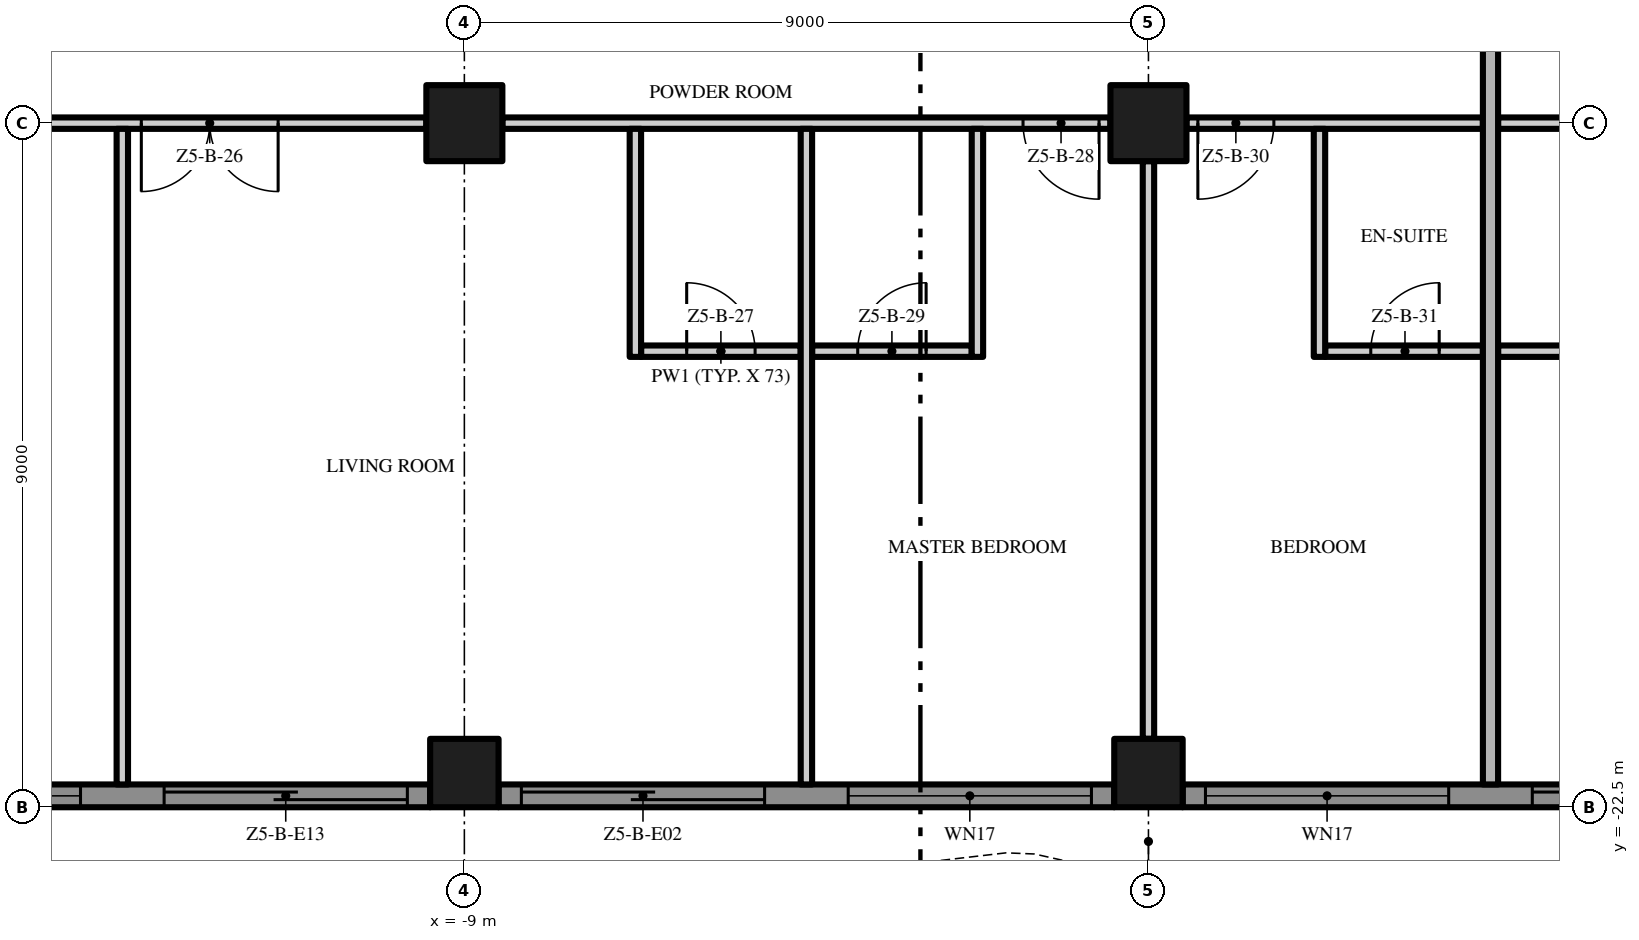
"""IFC4 building model, lengths in metres.
Left out: names, types, materials, properties, quantities, classifications, styles, units other than length and angle.
Written with IfcOpenShell. Run it as: python <this file> out.ifc"""

import sys

from ifc_helpers import new_model, si_unit, direction, frame, frame_2d, origin, origin_2d, place, context, subcontext, project, spatial, polyline, rectangle, outline, extrude, element, fill, save


model = new_model("IFC4")
c1 = context("Model", 3, precision=1e-05, world=origin(), true_north=direction((0.0, 1.0)))
c2 = subcontext(c1, "Body", "Model", "MODEL_VIEW")
j1 = project(units=[si_unit("LENGTHUNIT", "METRE"), si_unit("PLANEANGLEUNIT", "RADIAN")], contexts=[c1])
p1 = place(None, origin())
s1 = spatial("IfcSite", under=j1, at=p1, CompositionType="ELEMENT")
p2 = place(p1, origin())
s2 = spatial("IfcBuilding", under=s1, at=p2, CompositionType="ELEMENT")
p3 = place(p2, frame((0.0, 0.0, 254.0)))
s3 = spatial("IfcBuildingStorey", under=s2, at=p3, CompositionType="ELEMENT", Elevation=254.0)
p4 = place(p3, frame((-9.0, -13.5, 0.0), z_axis=(0.0, 0.0, 1.0), x_axis=(1.0, 0.0, 0.0)))
e1 = element("IfcColumn", 1, at=p4, inside=s3, PredefinedType="COLUMN", context=c2, shape_type="SweptSolid", body=[
    extrude(rectangle(XDim=1.0, YDim=1.0, at=origin_2d()), origin(), (0.0, 0.0, 1.0), 3.5),
])
p5 = place(p3, frame((-9.0, -22.05, 0.0), z_axis=(0.0, 0.0, 1.0), x_axis=(1.0, 0.0, 0.0)))
e2 = element("IfcColumn", 2, at=p5, inside=s3, PredefinedType="COLUMN", context=c2, shape_type="SweptSolid", body=[
    extrude(rectangle(XDim=0.9, YDim=0.9, at=origin_2d()), origin(), (0.0, 0.0, 1.0), 3.5),
])
p6 = place(p3, frame((0.0, -13.5, 0.0), z_axis=(0.0, 0.0, 1.0), x_axis=(1.0, 0.0, 0.0)))
e3 = element("IfcColumn", 3, at=p6, inside=s3, PredefinedType="COLUMN", context=c2, shape_type="SweptSolid", body=[
    extrude(rectangle(XDim=1.0, YDim=1.0, at=origin_2d()), origin(), (0.0, 0.0, 1.0), 3.5),
])
p7 = place(p3, frame((0.0, -22.05, 0.0), z_axis=(0.0, 0.0, 1.0), x_axis=(1.0, 0.0, 0.0)))
e4 = element("IfcColumn", 4, at=p7, inside=s3, PredefinedType="COLUMN", context=c2, shape_type="SweptSolid", body=[
    extrude(rectangle(XDim=0.9, YDim=0.9, at=origin_2d()), origin(), (0.0, 0.0, 1.0), 3.5),
])
p8 = place(p3, frame((-9.45, -22.35, 0.0), z_axis=(0.0, 0.0, 1.0), x_axis=(-1.0, 0.0, 0.0)))
e5 = element("IfcWall", 5, at=p8, inside=s3, PredefinedType="SOLIDWALL", context=c2, shape_type="SweptSolid", body=[
    extrude(rectangle(XDim=8.1, YDim=0.3, at=frame_2d((4.05, 0.0))), origin(), (0.0, 0.0, 1.0), 3.5),
])
p9 = place(p8, frame((4.6, 0.0, 0.45)))
e6 = element("IfcOpeningElement", 6, at=p9, cuts=e5, PredefinedType="OPENING", context=c2, shape_type="SweptSolid", body=[
    extrude(rectangle(XDim=3.2, YDim=2.65, at=frame_2d((1.6, 1.325))), frame((0.0, 0.16, 0.0), z_axis=(0.0, -1.0, 0.0), x_axis=(1.0, 0.0, 0.0)), (0.0, 0.0, 1.0), 0.32),
])
p10 = place(p8, frame((0.3, 0.0, 0.0)))
e7 = element("IfcOpeningElement", 7, at=p10, cuts=e5, PredefinedType="OPENING", context=c2, shape_type="SweptSolid", body=[
    extrude(rectangle(XDim=3.2, YDim=2.4, at=frame_2d((1.6, 1.2))), frame((0.0, 0.16, 0.0), z_axis=(0.0, -1.0, 0.0), x_axis=(1.0, 0.0, 0.0)), (0.0, 0.0, 1.0), 0.32),
])
p11 = place(p3, frame((-0.45, -22.35, 0.0), z_axis=(0.0, 0.0, 1.0), x_axis=(-1.0, 0.0, 0.0)))
e8 = element("IfcWall", 8, at=p11, inside=s3, PredefinedType="SOLIDWALL", context=c2, shape_type="SweptSolid", body=[
    extrude(rectangle(XDim=8.1, YDim=0.3, at=frame_2d((4.05, 0.0))), origin(), (0.0, 0.0, 1.0), 3.5),
])
p12 = place(p11, frame((4.6, 0.0, 0.0)))
e9 = element("IfcOpeningElement", 9, at=p12, cuts=e8, PredefinedType="OPENING", context=c2, shape_type="SweptSolid", body=[
    extrude(rectangle(XDim=3.2, YDim=2.4, at=frame_2d((1.6, 1.2))), frame((0.0, 0.16, 0.0), z_axis=(0.0, -1.0, 0.0), x_axis=(1.0, 0.0, 0.0)), (0.0, 0.0, 1.0), 0.32),
])
p13 = place(p11, frame((0.3, 0.0, 0.45)))
e10 = element("IfcOpeningElement", 10, at=p13, cuts=e8, PredefinedType="OPENING", context=c2, shape_type="SweptSolid", body=[
    extrude(rectangle(XDim=3.2, YDim=2.65, at=frame_2d((1.6, 1.325))), frame((0.0, 0.16, 0.0), z_axis=(0.0, -1.0, 0.0), x_axis=(1.0, 0.0, 0.0)), (0.0, 0.0, 1.0), 0.32),
])
p14 = place(p3, frame((8.55, -22.35, 0.0), z_axis=(0.0, 0.0, 1.0), x_axis=(-1.0, 0.0, 0.0)))
e11 = element("IfcWall", 11, at=p14, inside=s3, PredefinedType="SOLIDWALL", context=c2, shape_type="SweptSolid", body=[
    extrude(rectangle(XDim=8.1, YDim=0.3, at=frame_2d((4.05, 0.0))), origin(), (0.0, 0.0, 1.0), 3.5),
])
p15 = place(p14, frame((4.6, 0.0, 0.45)))
e12 = element("IfcOpeningElement", 12, at=p15, cuts=e11, PredefinedType="OPENING", context=c2, shape_type="SweptSolid", body=[
    extrude(rectangle(XDim=3.2, YDim=2.65, at=frame_2d((1.6, 1.325))), frame((0.0, 0.16, 0.0), z_axis=(0.0, -1.0, 0.0), x_axis=(1.0, 0.0, 0.0)), (0.0, 0.0, 1.0), 0.32),
])
p16 = place(p14, frame((0.3, 0.0, 0.0)))
e13 = element("IfcOpeningElement", 13, at=p16, cuts=e11, PredefinedType="OPENING", context=c2, shape_type="SweptSolid", body=[
    extrude(rectangle(XDim=3.2, YDim=2.4, at=frame_2d((1.6, 1.2))), frame((0.0, 0.16, 0.0), z_axis=(0.0, -1.0, 0.0), x_axis=(1.0, 0.0, 0.0)), (0.0, 0.0, 1.0), 0.32),
])
p17 = place(p3, origin())
e14 = element("IfcWall", 14, at=p17, inside=s3, PredefinedType="USERDEFINED", context=c2, shape_type="SweptSolid", body=[
    extrude(outline(polyline([(-22.5, -25.149), (-21.0, -24.488), (-19.5, -23.755), (-18.0, -23.231), (-16.875, -23.1), (-16.5, -23.115), (-15.0, -23.451), (-13.5, -24.112), (-12.0, -24.845), (-10.5, -25.369), (-9.375, -25.5), (-9.0, -25.485), (-7.5, -25.149), (-6.0, -24.488), (-4.5, -23.755), (-3.0, -23.231), (-1.875, -23.1), (-1.5, -23.115), (0.0, -23.451), (1.5, -24.112), (3.0, -24.845), (4.5, -25.369), (5.625, -25.5), (6.0, -25.485), (7.5, -25.149), (9.0, -24.488), (10.5, -23.755), (12.0, -23.231), (13.125, -23.1), (13.5, -23.115), (15.0, -23.451), (16.5, -24.112), (18.0, -24.845), (19.5, -25.369), (20.625, -25.5), (21.0, -25.485), (22.5, -25.149), (22.445, -24.905), (20.967, -25.236), (20.635, -25.249), (19.556, -25.124), (18.096, -24.614), (16.605, -23.885), (15.079, -23.213), (13.533, -22.866), (13.115, -22.849), (11.944, -22.986), (10.404, -23.524), (8.895, -24.261), (7.421, -24.91), (5.967, -25.236), (5.635, -25.249), (4.556, -25.124), (3.096, -24.614), (1.605, -23.885), (0.079, -23.213), (-1.467, -22.866), (-1.885, -22.849), (-3.056, -22.986), (-4.596, -23.524), (-6.105, -24.261), (-7.579, -24.91), (-9.033, -25.236), (-9.365, -25.249), (-10.444, -25.124), (-11.904, -24.614), (-13.395, -23.885), (-14.921, -23.213), (-16.467, -22.866), (-16.885, -22.849), (-18.056, -22.986), (-19.596, -23.524), (-21.105, -24.261), (-22.601, -24.92), (-22.5, -25.149)])), origin(), (0.0, 0.0, 1.0), 0.9),
])
p18 = place(p3, frame((-6.675, -16.5, 0.0), z_axis=(0.0, 0.0, 1.0), x_axis=(1.0, 0.0, 0.0)))
e15 = element("IfcWall", 15, at=p18, inside=s3, PredefinedType="PARTITIONING", context=c2, shape_type="SweptSolid", body=[
    extrude(rectangle(XDim=2.1, YDim=0.15, at=frame_2d((1.05, 0.0))), origin(), (0.0, 0.0, 1.0), 3.5),
])
p19 = place(p18, frame((0.6, 0.0, 0.0)))
e16 = element("IfcOpeningElement", 16, at=p19, cuts=e15, PredefinedType="OPENING", context=c2, shape_type="SweptSolid", body=[
    extrude(rectangle(XDim=0.9, YDim=2.1, at=frame_2d((0.45, 1.05))), frame((0.0, 0.085, 0.0), z_axis=(0.0, -1.0, 0.0), x_axis=(1.0, 0.0, 0.0)), (0.0, 0.0, 1.0), 0.17),
])
p20 = place(p3, frame((-4.425, -16.5, 0.0), z_axis=(0.0, 0.0, 1.0), x_axis=(1.0, 0.0, 0.0)))
e17 = element("IfcWall", 17, at=p20, inside=s3, PredefinedType="PARTITIONING", context=c2, shape_type="SweptSolid", body=[
    extrude(rectangle(XDim=2.1, YDim=0.15, at=frame_2d((1.05, 0.0))), origin(), (0.0, 0.0, 1.0), 3.5),
])
p21 = place(p20, frame((0.6, 0.0, 0.0)))
e18 = element("IfcOpeningElement", 18, at=p21, cuts=e17, PredefinedType="OPENING", context=c2, shape_type="SweptSolid", body=[
    extrude(rectangle(XDim=0.9, YDim=2.1, at=frame_2d((0.45, 1.05))), frame((0.0, 0.085, 0.0), z_axis=(0.0, -1.0, 0.0), x_axis=(1.0, 0.0, 0.0)), (0.0, 0.0, 1.0), 0.17),
])
p22 = place(p3, frame((2.325, -16.5, 0.0), z_axis=(0.0, 0.0, 1.0), x_axis=(1.0, 0.0, 0.0)))
e19 = element("IfcWall", 19, at=p22, inside=s3, PredefinedType="PARTITIONING", context=c2, shape_type="SweptSolid", body=[
    extrude(rectangle(XDim=2.075, YDim=0.15, at=frame_2d((1.038, 0.0))), origin(), (0.0, 0.0, 1.0), 3.5),
])
p23 = place(p22, frame((0.6, 0.0, 0.0)))
e20 = element("IfcOpeningElement", 20, at=p23, cuts=e19, PredefinedType="OPENING", context=c2, shape_type="SweptSolid", body=[
    extrude(rectangle(XDim=0.9, YDim=2.1, at=frame_2d((0.45, 1.05))), frame((0.0, 0.085, 0.0), z_axis=(0.0, -1.0, 0.0), x_axis=(1.0, 0.0, 0.0)), (0.0, 0.0, 1.0), 0.17),
])
p24 = place(p3, frame((4.6, -16.5, 0.0), z_axis=(0.0, 0.0, 1.0), x_axis=(1.0, 0.0, 0.0)))
e21 = element("IfcWall", 21, at=p24, inside=s3, PredefinedType="PARTITIONING", context=c2, shape_type="SweptSolid", body=[
    extrude(rectangle(XDim=2.075, YDim=0.15, at=frame_2d((1.038, 0.0))), origin(), (0.0, 0.0, 1.0), 3.5),
])
p25 = place(p3, frame((-9.5, -13.5, 0.0), z_axis=(0.0, 0.0, 1.0), x_axis=(-1.0, 0.0, 0.0)))
e22 = element("IfcWall", 22, at=p25, inside=s3, PredefinedType="PARTITIONING", context=c2, shape_type="SweptSolid", body=[
    extrude(rectangle(XDim=8.0, YDim=0.15, at=frame_2d((4.0, 0.0))), origin(), (0.0, 0.0, 1.0), 3.5),
])
p26 = place(p25, frame((1.95, 0.0, 0.0)))
e23 = element("IfcOpeningElement", 23, at=p26, cuts=e22, PredefinedType="OPENING", context=c2, shape_type="SweptSolid", body=[
    extrude(rectangle(XDim=1.8, YDim=2.4, at=frame_2d((0.9, 1.2))), frame((0.0, 0.085, 0.0), z_axis=(0.0, -1.0, 0.0), x_axis=(1.0, 0.0, 0.0)), (0.0, 0.0, 1.0), 0.17),
])
p27 = place(p3, frame((-0.5, -13.5, 0.0), z_axis=(0.0, 0.0, 1.0), x_axis=(-1.0, 0.0, 0.0)))
e24 = element("IfcWall", 24, at=p27, inside=s3, PredefinedType="PARTITIONING", context=c2, shape_type="SweptSolid", body=[
    extrude(rectangle(XDim=8.0, YDim=0.15, at=frame_2d((4.0, 0.0))), origin(), (0.0, 0.0, 1.0), 3.5),
])
p28 = place(p27, frame((0.15, 0.0, 0.0)))
e25 = element("IfcOpeningElement", 25, at=p28, cuts=e24, PredefinedType="OPENING", context=c2, shape_type="SweptSolid", body=[
    extrude(rectangle(XDim=1.0, YDim=2.4, at=frame_2d((0.5, 1.2))), frame((0.0, 0.085, 0.0), z_axis=(0.0, -1.0, 0.0), x_axis=(1.0, 0.0, 0.0)), (0.0, 0.0, 1.0), 0.17),
])
p29 = place(p3, frame((4.4, -13.5, 0.0), z_axis=(0.0, 0.0, 1.0), x_axis=(-1.0, 0.0, 0.0)))
e26 = element("IfcWall", 26, at=p29, inside=s3, PredefinedType="PARTITIONING", context=c2, shape_type="SweptSolid", body=[
    extrude(rectangle(XDim=3.9, YDim=0.15, at=frame_2d((1.95, 0.0))), origin(), (0.0, 0.0, 1.0), 3.5),
])
p30 = place(p29, frame((2.75, 0.0, 0.0)))
e27 = element("IfcOpeningElement", 27, at=p30, cuts=e26, PredefinedType="OPENING", context=c2, shape_type="SweptSolid", body=[
    extrude(rectangle(XDim=1.0, YDim=2.4, at=frame_2d((0.5, 1.2))), frame((0.0, 0.085, 0.0), z_axis=(0.0, -1.0, 0.0), x_axis=(1.0, 0.0, 0.0)), (0.0, 0.0, 1.0), 0.17),
])
p31 = place(p3, frame((4.6, -13.5, 0.0), z_axis=(0.0, 0.0, 1.0), x_axis=(1.0, 0.0, 0.0)))
e28 = element("IfcWall", 28, at=p31, inside=s3, PredefinedType="PARTITIONING", context=c2, shape_type="SweptSolid", body=[
    extrude(rectangle(XDim=3.9, YDim=0.15, at=frame_2d((1.95, 0.0))), origin(), (0.0, 0.0, 1.0), 3.5),
])
p32 = place(p3, frame((-13.5, -22.2, 0.0), z_axis=(0.0, 0.0, 1.0), x_axis=(0.0, 1.0, 0.0)))
e29 = element("IfcWall", 29, at=p32, inside=s3, PredefinedType="PARTITIONING", context=c2, shape_type="SweptSolid", body=[
    extrude(rectangle(XDim=8.625, YDim=0.15, at=frame_2d((4.312, 0.0))), origin(), (0.0, 0.0, 1.0), 3.5),
])
p33 = place(p3, frame((-6.75, -16.575, 0.0), z_axis=(0.0, 0.0, 1.0), x_axis=(0.0, 1.0, 0.0)))
e30 = element("IfcWall", 30, at=p33, inside=s3, PredefinedType="PARTITIONING", context=c2, shape_type="SweptSolid", body=[
    extrude(rectangle(XDim=3.0, YDim=0.15, at=frame_2d((1.5, 0.0))), origin(), (0.0, 0.0, 1.0), 3.5),
])
p34 = place(p3, frame((-4.5, -22.2, 0.0), z_axis=(0.0, 0.0, 1.0), x_axis=(0.0, 1.0, 0.0)))
e31 = element("IfcWall", 31, at=p34, inside=s3, PredefinedType="PARTITIONING", context=c2, shape_type="SweptSolid", body=[
    extrude(rectangle(XDim=8.625, YDim=0.15, at=frame_2d((4.312, 0.0))), origin(), (0.0, 0.0, 1.0), 3.5),
])
p35 = place(p3, frame((-2.25, -16.575, 0.0), z_axis=(0.0, 0.0, 1.0), x_axis=(0.0, 1.0, 0.0)))
e32 = element("IfcWall", 32, at=p35, inside=s3, PredefinedType="PARTITIONING", context=c2, shape_type="SweptSolid", body=[
    extrude(rectangle(XDim=3.0, YDim=0.15, at=frame_2d((1.5, 0.0))), origin(), (0.0, 0.0, 1.0), 3.5),
])
p36 = place(p3, frame((0.0, -21.6, 0.0), z_axis=(0.0, 0.0, 1.0), x_axis=(0.0, 1.0, 0.0)))
e33 = element("IfcWall", 33, at=p36, inside=s3, PredefinedType="PARTITIONING", context=c2, shape_type="SweptSolid", body=[
    extrude(rectangle(XDim=7.6, YDim=0.15, at=frame_2d((3.8, 0.0))), origin(), (0.0, 0.0, 1.0), 3.5),
])
p37 = place(p3, frame((2.25, -16.575, 0.0), z_axis=(0.0, 0.0, 1.0), x_axis=(0.0, 1.0, 0.0)))
e34 = element("IfcWall", 34, at=p37, inside=s3, PredefinedType="PARTITIONING", context=c2, shape_type="SweptSolid", body=[
    extrude(rectangle(XDim=3.0, YDim=0.15, at=frame_2d((1.5, 0.0))), origin(), (0.0, 0.0, 1.0), 3.5),
])
p38 = place(p3, frame((4.5, -22.2, 0.0), z_axis=(0.0, 0.0, 1.0), x_axis=(0.0, 1.0, 0.0)))
e35 = element("IfcWall", 35, at=p38, inside=s3, PredefinedType="PARTITIONING", context=c2, shape_type="SweptSolid", body=[
    extrude(rectangle(XDim=22.1, YDim=0.2, at=frame_2d((11.05, 0.0))), origin(), (0.0, 0.0, 1.0), 3.5),
])
p39 = place(p9, origin())
e36 = element("IfcWindow", 36, at=p39, inside=s3, PartitioningType="SINGLE_PANEL", PredefinedType="WINDOW", context=c2, shape_type="SweptSolid", body=[
    extrude(rectangle(XDim=3.2, YDim=2.65, at=frame_2d((1.6, 1.325))), frame((0.0, 0.03, 0.0), z_axis=(0.0, -1.0, 0.0), x_axis=(1.0, 0.0, 0.0)), (0.0, 0.0, 1.0), 0.06),
])
fill(e6, e36)
p40 = place(p10, origin())
e37 = element("IfcDoor", 37, at=p40, inside=s3, OperationType="SINGLE_SWING_LEFT", PredefinedType="DOOR", context=c2, shape_type="SweptSolid", body=[
    extrude(rectangle(XDim=3.2, YDim=2.4, at=frame_2d((1.6, 1.2))), frame((0.0, 0.025, 0.0), z_axis=(0.0, -1.0, 0.0), x_axis=(1.0, 0.0, 0.0)), (0.0, 0.0, 1.0), 0.05),
])
fill(e7, e37)
p41 = place(p12, origin())
e38 = element("IfcDoor", 38, at=p41, inside=s3, OperationType="SINGLE_SWING_LEFT", PredefinedType="DOOR", context=c2, shape_type="SweptSolid", body=[
    extrude(rectangle(XDim=3.2, YDim=2.4, at=frame_2d((1.6, 1.2))), frame((0.0, 0.025, 0.0), z_axis=(0.0, -1.0, 0.0), x_axis=(1.0, 0.0, 0.0)), (0.0, 0.0, 1.0), 0.05),
])
fill(e9, e38)
p42 = place(p13, origin())
e39 = element("IfcWindow", 39, at=p42, inside=s3, PartitioningType="SINGLE_PANEL", PredefinedType="WINDOW", context=c2, shape_type="SweptSolid", body=[
    extrude(rectangle(XDim=3.2, YDim=2.65, at=frame_2d((1.6, 1.325))), frame((0.0, 0.03, 0.0), z_axis=(0.0, -1.0, 0.0), x_axis=(1.0, 0.0, 0.0)), (0.0, 0.0, 1.0), 0.06),
])
fill(e10, e39)
p43 = place(p15, origin())
e40 = element("IfcWindow", 40, at=p43, inside=s3, PartitioningType="SINGLE_PANEL", PredefinedType="WINDOW", context=c2, shape_type="SweptSolid", body=[
    extrude(rectangle(XDim=3.2, YDim=2.65, at=frame_2d((1.6, 1.325))), frame((0.0, 0.03, 0.0), z_axis=(0.0, -1.0, 0.0), x_axis=(1.0, 0.0, 0.0)), (0.0, 0.0, 1.0), 0.06),
])
fill(e12, e40)
p44 = place(p16, origin())
e41 = element("IfcDoor", 41, at=p44, inside=s3, OperationType="SINGLE_SWING_LEFT", PredefinedType="DOOR", context=c2, shape_type="SweptSolid", body=[
    extrude(rectangle(XDim=3.2, YDim=2.4, at=frame_2d((1.6, 1.2))), frame((0.0, 0.025, 0.0), z_axis=(0.0, -1.0, 0.0), x_axis=(1.0, 0.0, 0.0)), (0.0, 0.0, 1.0), 0.05),
])
fill(e13, e41)
p45 = place(p26, origin())
e42 = element("IfcDoor", 42, at=p45, inside=s3, OperationType="DOUBLE_DOOR_SINGLE_SWING", PredefinedType="DOOR", context=c2, shape_type="SweptSolid", body=[
    extrude(rectangle(XDim=1.8, YDim=2.4, at=frame_2d((0.9, 1.2))), frame((0.0, 0.025, 0.0), z_axis=(0.0, -1.0, 0.0), x_axis=(1.0, 0.0, 0.0)), (0.0, 0.0, 1.0), 0.05),
])
fill(e23, e42)
p46 = place(p19, origin())
e43 = element("IfcDoor", 43, at=p46, inside=s3, OperationType="SINGLE_SWING_LEFT", PredefinedType="DOOR", context=c2, shape_type="SweptSolid", body=[
    extrude(rectangle(XDim=0.9, YDim=2.1, at=frame_2d((0.45, 1.05))), frame((0.0, 0.025, 0.0), z_axis=(0.0, -1.0, 0.0), x_axis=(1.0, 0.0, 0.0)), (0.0, 0.0, 1.0), 0.05),
])
fill(e16, e43)
p47 = place(p28, origin())
e44 = element("IfcDoor", 44, at=p47, inside=s3, OperationType="SINGLE_SWING_LEFT", PredefinedType="DOOR", context=c2, shape_type="SweptSolid", body=[
    extrude(rectangle(XDim=1.0, YDim=2.4, at=frame_2d((0.5, 1.2))), frame((0.0, 0.025, 0.0), z_axis=(0.0, -1.0, 0.0), x_axis=(1.0, 0.0, 0.0)), (0.0, 0.0, 1.0), 0.05),
])
fill(e25, e44)
p48 = place(p21, origin())
e45 = element("IfcDoor", 45, at=p48, inside=s3, OperationType="SINGLE_SWING_RIGHT", PredefinedType="DOOR", context=c2, shape_type="SweptSolid", body=[
    extrude(rectangle(XDim=0.9, YDim=2.1, at=frame_2d((0.45, 1.05))), frame((0.0, 0.025, 0.0), z_axis=(0.0, -1.0, 0.0), x_axis=(1.0, 0.0, 0.0)), (0.0, 0.0, 1.0), 0.05),
])
fill(e18, e45)
p49 = place(p30, origin())
e46 = element("IfcDoor", 46, at=p49, inside=s3, OperationType="SINGLE_SWING_RIGHT", PredefinedType="DOOR", context=c2, shape_type="SweptSolid", body=[
    extrude(rectangle(XDim=1.0, YDim=2.4, at=frame_2d((0.5, 1.2))), frame((0.0, 0.025, 0.0), z_axis=(0.0, -1.0, 0.0), x_axis=(1.0, 0.0, 0.0)), (0.0, 0.0, 1.0), 0.05),
])
fill(e27, e46)
p50 = place(p23, origin())
e47 = element("IfcDoor", 47, at=p50, inside=s3, OperationType="SINGLE_SWING_RIGHT", PredefinedType="DOOR", context=c2, shape_type="SweptSolid", body=[
    extrude(rectangle(XDim=0.9, YDim=2.1, at=frame_2d((0.45, 1.05))), frame((0.0, 0.025, 0.0), z_axis=(0.0, -1.0, 0.0), x_axis=(1.0, 0.0, 0.0)), (0.0, 0.0, 1.0), 0.05),
])
fill(e20, e47)
save(model, sys.argv[1])
